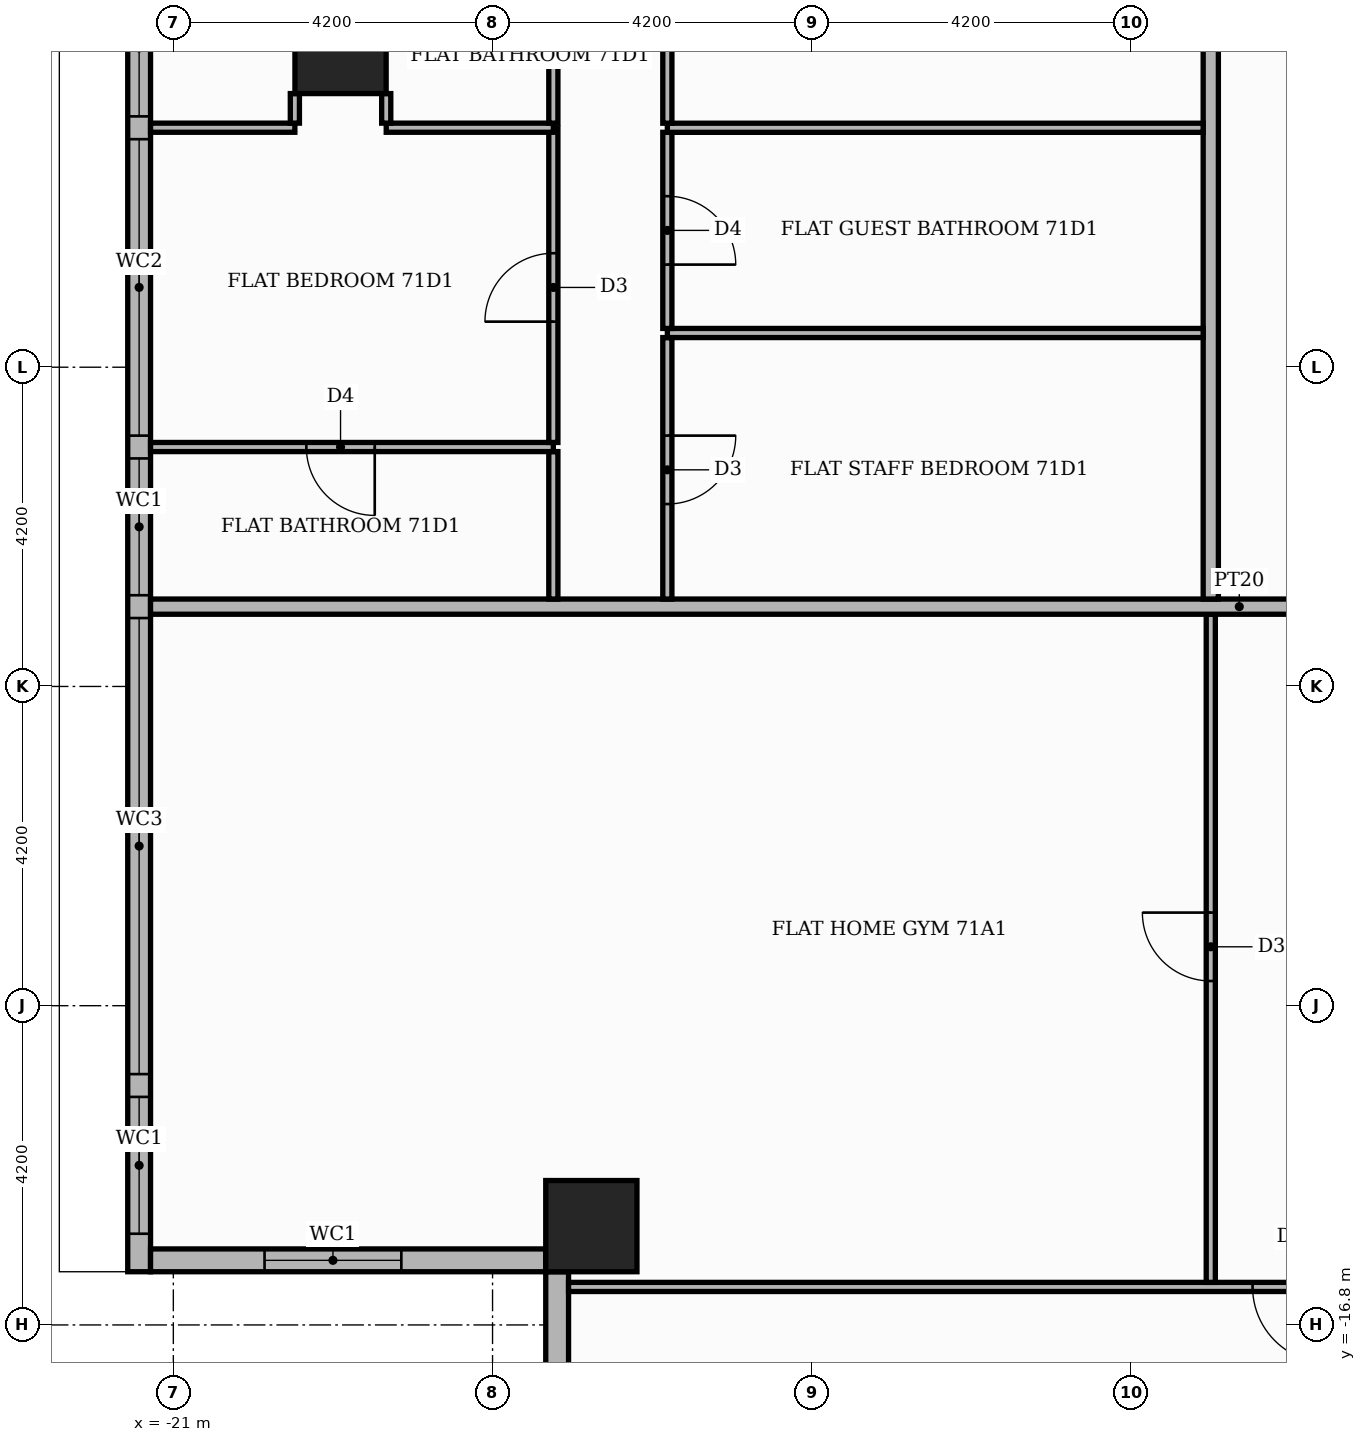
"""IFC4 building model, lengths in metres.
Left out: names, types, materials, properties, quantities, classifications, styles, units other than length and angle.
Written with IfcOpenShell. Run it as: python <this file> out.ifc"""

import sys

from ifc_helpers import new_model, si_unit, direction, frame, frame_2d, origin, origin_2d, place, context, subcontext, project, spatial, rectangle, extrude, element, fill, save


model = new_model("IFC4")
c1 = context("Model", 3, precision=1e-05, world=origin(), true_north=direction((0.0, 1.0)))
c2 = subcontext(c1, "Body", "Model", "MODEL_VIEW")
j1 = project(units=[si_unit("LENGTHUNIT", "METRE"), si_unit("PLANEANGLEUNIT", "RADIAN")], contexts=[c1])
p1 = place(None, origin())
s1 = spatial("IfcSite", under=j1, at=p1, CompositionType="ELEMENT")
p2 = place(p1, origin())
s2 = spatial("IfcBuilding", under=s1, at=p2, CompositionType="ELEMENT")
p3 = place(p2, frame((0.0, 0.0, 296.7)))
s3 = spatial("IfcBuildingStorey", under=s2, at=p3, CompositionType="ELEMENT", Elevation=296.7)
for number, where, z_axis, x_axis in (
    (1, (-18.8, 0.0, 0.0), (0.0, 0.0, 1.0), (1.0, 0.0, 0.0)),
    (2, (-15.5, -15.5, 0.0), (0.0, 0.0, 1.0), (1.0, 0.0, 0.0)),
):
    element("IfcColumn", number, at=place(p3, frame(where, z_axis=z_axis, x_axis=x_axis)), inside=s3, PredefinedType="COLUMN", context=c2, shape_type="SweptSolid", body=[
        extrude(rectangle(XDim=1.2, YDim=1.2, at=origin_2d()), origin(), (0.0, 0.0, 1.0), 3.9),
    ])
p4 = place(p3, frame((-21.45, 15.8, 0.0), z_axis=(0.0, 0.0, 1.0), x_axis=(0.0, -1.0, 0.0)))
e3 = element("IfcWall", 3, at=p4, inside=s3, PredefinedType="STANDARD", context=c2, shape_type="SweptSolid", body=[
    extrude(rectangle(XDim=31.9, YDim=0.3, at=frame_2d((15.95, 0.0))), origin(), (0.0, 0.0, 1.0), 3.55),
])
p5 = place(p4, frame((0.2, 0.0, 0.6)))
e4 = element("IfcOpeningElement", 4, at=p5, cuts=e3, PredefinedType="OPENING", context=c2, shape_type="SweptSolid", body=[
    extrude(rectangle(XDim=6.0, YDim=2.4, at=frame_2d((3.0, 1.2))), frame((0.0, 0.16, 0.0), z_axis=(0.0, -1.0, 0.0), x_axis=(1.0, 0.0, 0.0)), (0.0, 0.0, 1.0), 0.32),
])
p6 = place(p4, frame((6.5, 0.0, 0.6)))
e5 = element("IfcOpeningElement", 5, at=p6, cuts=e3, PredefinedType="OPENING", context=c2, shape_type="SweptSolid", body=[
    extrude(rectangle(XDim=1.8, YDim=2.4, at=frame_2d((0.9, 1.2))), frame((0.0, 0.16, 0.0), z_axis=(0.0, -1.0, 0.0), x_axis=(1.0, 0.0, 0.0)), (0.0, 0.0, 1.0), 0.32),
])
p7 = place(p4, frame((8.6, 0.0, 0.6)))
e6 = element("IfcOpeningElement", 6, at=p7, cuts=e3, PredefinedType="OPENING", context=c2, shape_type="SweptSolid", body=[
    extrude(rectangle(XDim=3.9, YDim=2.4, at=frame_2d((1.95, 1.2))), frame((0.0, 0.16, 0.0), z_axis=(0.0, -1.0, 0.0), x_axis=(1.0, 0.0, 0.0)), (0.0, 0.0, 1.0), 0.32),
])
p8 = place(p4, frame((12.8, 0.0, 0.6)))
e7 = element("IfcOpeningElement", 7, at=p8, cuts=e3, PredefinedType="OPENING", context=c2, shape_type="SweptSolid", body=[
    extrude(rectangle(XDim=1.8, YDim=2.4, at=frame_2d((0.9, 1.2))), frame((0.0, 0.16, 0.0), z_axis=(0.0, -1.0, 0.0), x_axis=(1.0, 0.0, 0.0)), (0.0, 0.0, 1.0), 0.32),
])
p9 = place(p4, frame((14.9, 0.0, 0.6)))
e8 = element("IfcOpeningElement", 8, at=p9, cuts=e3, PredefinedType="OPENING", context=c2, shape_type="SweptSolid", body=[
    extrude(rectangle(XDim=1.8, YDim=2.4, at=frame_2d((0.9, 1.2))), frame((0.0, 0.16, 0.0), z_axis=(0.0, -1.0, 0.0), x_axis=(1.0, 0.0, 0.0)), (0.0, 0.0, 1.0), 0.32),
])
p10 = place(p4, frame((17.0, 0.0, 0.6)))
e9 = element("IfcOpeningElement", 9, at=p10, cuts=e3, PredefinedType="OPENING", context=c2, shape_type="SweptSolid", body=[
    extrude(rectangle(XDim=3.9, YDim=2.4, at=frame_2d((1.95, 1.2))), frame((0.0, 0.16, 0.0), z_axis=(0.0, -1.0, 0.0), x_axis=(1.0, 0.0, 0.0)), (0.0, 0.0, 1.0), 0.32),
])
p11 = place(p4, frame((21.2, 0.0, 0.6)))
e10 = element("IfcOpeningElement", 10, at=p11, cuts=e3, PredefinedType="OPENING", context=c2, shape_type="SweptSolid", body=[
    extrude(rectangle(XDim=1.8, YDim=2.4, at=frame_2d((0.9, 1.2))), frame((0.0, 0.16, 0.0), z_axis=(0.0, -1.0, 0.0), x_axis=(1.0, 0.0, 0.0)), (0.0, 0.0, 1.0), 0.32),
])
p12 = place(p4, frame((23.3, 0.0, 0.6)))
e11 = element("IfcOpeningElement", 11, at=p12, cuts=e3, PredefinedType="OPENING", context=c2, shape_type="SweptSolid", body=[
    extrude(rectangle(XDim=6.0, YDim=2.4, at=frame_2d((3.0, 1.2))), frame((0.0, 0.16, 0.0), z_axis=(0.0, -1.0, 0.0), x_axis=(1.0, 0.0, 0.0)), (0.0, 0.0, 1.0), 0.32),
])
p13 = place(p4, frame((29.6, 0.0, 0.6)))
e12 = element("IfcOpeningElement", 12, at=p13, cuts=e3, PredefinedType="OPENING", context=c2, shape_type="SweptSolid", body=[
    extrude(rectangle(XDim=1.8, YDim=2.4, at=frame_2d((0.9, 1.2))), frame((0.0, 0.16, 0.0), z_axis=(0.0, -1.0, 0.0), x_axis=(1.0, 0.0, 0.0)), (0.0, 0.0, 1.0), 0.32),
])
p14 = place(p3, frame((-21.3, -15.95, 0.0), z_axis=(0.0, 0.0, 1.0), x_axis=(1.0, 0.0, 0.0)))
e13 = element("IfcWall", 13, at=p14, inside=s3, PredefinedType="STANDARD", context=c2, shape_type="SweptSolid", body=[
    extrude(rectangle(XDim=5.2, YDim=0.3, at=frame_2d((2.6, 0.0))), origin(), (0.0, 0.0, 1.0), 3.55),
])
p15 = place(p14, frame((1.5, 0.0, 0.6)))
e14 = element("IfcOpeningElement", 14, at=p15, cuts=e13, PredefinedType="OPENING", context=c2, shape_type="SweptSolid", body=[
    extrude(rectangle(XDim=1.8, YDim=2.4, at=frame_2d((0.9, 1.2))), frame((0.0, 0.16, 0.0), z_axis=(0.0, -1.0, 0.0), x_axis=(1.0, 0.0, 0.0)), (0.0, 0.0, 1.0), 0.32),
])
p16 = place(p3, frame((-15.95, -16.1, 0.0), z_axis=(0.0, 0.0, 1.0), x_axis=(0.0, -1.0, 0.0)))
e15 = element("IfcWall", 15, at=p16, inside=s3, PredefinedType="STANDARD", context=c2, shape_type="SweptSolid", body=[
    extrude(rectangle(XDim=5.5, YDim=0.3, at=frame_2d((2.75, 0.0))), origin(), (0.0, 0.0, 1.0), 3.55),
])
p17 = place(p16, frame((1.9, 0.0, 0.6)))
e16 = element("IfcOpeningElement", 16, at=p17, cuts=e15, PredefinedType="OPENING", context=c2, shape_type="SweptSolid", body=[
    extrude(rectangle(XDim=1.8, YDim=2.4, at=frame_2d((0.9, 1.2))), frame((0.0, 0.16, 0.0), z_axis=(0.0, -1.0, 0.0), x_axis=(1.0, 0.0, 0.0)), (0.0, 0.0, 1.0), 0.32),
])
p18 = place(p3, frame((-15.8, -16.3, 0.0), z_axis=(0.0, 0.0, 1.0), x_axis=(1.0, 0.0, 0.0)))
e17 = element("IfcWall", 17, at=p18, inside=s3, PredefinedType="PARTITIONING", context=c2, shape_type="SweptSolid", body=[
    extrude(rectangle(XDim=23.05, YDim=0.12, at=frame_2d((11.525, 0.0))), origin(), (0.0, 0.0, 1.0), 3.55),
])
p19 = place(p18, frame((9.0, 0.0, 0.0)))
e18 = element("IfcOpeningElement", 18, at=p19, cuts=e17, PredefinedType="OPENING", context=c2, shape_type="SweptSolid", body=[
    extrude(rectangle(XDim=1.0, YDim=2.1, at=frame_2d((0.5, 1.05))), frame((0.0, 0.07, 0.0), z_axis=(0.0, -1.0, 0.0), x_axis=(1.0, 0.0, 0.0)), (0.0, 0.0, 1.0), 0.14),
])
p20 = place(p18, frame((12.15, 0.0, 0.0)))
e19 = element("IfcOpeningElement", 19, at=p20, cuts=e17, PredefinedType="OPENING", context=c2, shape_type="SweptSolid", body=[
    extrude(rectangle(XDim=1.0, YDim=2.1, at=frame_2d((0.5, 1.05))), frame((0.0, 0.07, 0.0), z_axis=(0.0, -1.0, 0.0), x_axis=(1.0, 0.0, 0.0)), (0.0, 0.0, 1.0), 0.14),
])
p21 = place(p18, frame((16.4, 0.0, 0.0)))
e20 = element("IfcOpeningElement", 20, at=p21, cuts=e17, PredefinedType="OPENING", context=c2, shape_type="SweptSolid", body=[
    extrude(rectangle(XDim=0.9, YDim=2.1, at=frame_2d((0.45, 1.05))), frame((0.0, 0.07, 0.0), z_axis=(0.0, -1.0, 0.0), x_axis=(1.0, 0.0, 0.0)), (0.0, 0.0, 1.0), 0.14),
])
p22 = place(p3, frame((-7.35, -16.24, 0.0), z_axis=(0.0, 0.0, 1.0), x_axis=(0.0, 1.0, 0.0)))
e21 = element("IfcWall", 21, at=p22, inside=s3, PredefinedType="PARTITIONING", context=c2, shape_type="SweptSolid", body=[
    extrude(rectangle(XDim=8.79, YDim=0.12, at=frame_2d((4.395, 0.0))), origin(), (0.0, 0.0, 1.0), 3.55),
])
p23 = place(p22, frame((3.965, 0.0, 0.0)))
e22 = element("IfcOpeningElement", 22, at=p23, cuts=e21, PredefinedType="OPENING", context=c2, shape_type="SweptSolid", body=[
    extrude(rectangle(XDim=0.9, YDim=2.1, at=frame_2d((0.45, 1.05))), frame((0.0, 0.07, 0.0), z_axis=(0.0, -1.0, 0.0), x_axis=(1.0, 0.0, 0.0)), (0.0, 0.0, 1.0), 0.14),
])
p24 = place(p3, frame((-21.3, -7.35, 0.0), z_axis=(0.0, 0.0, 1.0), x_axis=(1.0, 0.0, 0.0)))
e23 = element("IfcWall", 23, at=p24, inside=s3, PredefinedType="PARTITIONING", context=c2, shape_type="SweptSolid", body=[
    extrude(rectangle(XDim=28.65, YDim=0.2, at=frame_2d((14.325, 0.0))), origin(), (0.0, 0.0, 1.0), 3.55),
])
p25 = place(p24, frame((16.55, 0.0, 0.0)))
e24 = element("IfcOpeningElement", 24, at=p25, cuts=e23, PredefinedType="OPENING", context=c2, shape_type="SweptSolid", body=[
    extrude(rectangle(XDim=1.1, YDim=2.4, at=frame_2d((0.55, 1.2))), frame((0.0, 0.11, 0.0), z_axis=(0.0, -1.0, 0.0), x_axis=(1.0, 0.0, 0.0)), (0.0, 0.0, 1.0), 0.22),
])
p26 = place(p3, frame((-16.0, -7.25, 0.0), z_axis=(0.0, 0.0, 1.0), x_axis=(0.0, 1.0, 0.0)))
e25 = element("IfcWall", 25, at=p26, inside=s3, PredefinedType="PARTITIONING", context=c2, shape_type="SweptSolid", body=[
    extrude(rectangle(XDim=1.94, YDim=0.12, at=frame_2d((0.97, 0.0))), origin(), (0.0, 0.0, 1.0), 3.55),
])
p27 = place(p3, frame((-14.5, -7.25, 0.0), z_axis=(0.0, 0.0, 1.0), x_axis=(0.0, 1.0, 0.0)))
e26 = element("IfcWall", 26, at=p27, inside=s3, PredefinedType="PARTITIONING", context=c2, shape_type="SweptSolid", body=[
    extrude(rectangle(XDim=3.44, YDim=0.12, at=frame_2d((1.72, 0.0))), origin(), (0.0, 0.0, 1.0), 3.55),
])
p28 = place(p27, frame((1.25, 0.0, 0.0)))
e27 = element("IfcOpeningElement", 27, at=p28, cuts=e26, PredefinedType="OPENING", context=c2, shape_type="SweptSolid", body=[
    extrude(rectangle(XDim=0.9, YDim=2.1, at=frame_2d((0.45, 1.05))), frame((0.0, 0.07, 0.0), z_axis=(0.0, -1.0, 0.0), x_axis=(1.0, 0.0, 0.0)), (0.0, 0.0, 1.0), 0.14),
])
p29 = place(p3, frame((-7.35, -7.25, 0.0), z_axis=(0.0, 0.0, 1.0), x_axis=(0.0, 1.0, 0.0)))
e28 = element("IfcWall", 28, at=p29, inside=s3, PredefinedType="PARTITIONING", context=c2, shape_type="SweptSolid", body=[
    extrude(rectangle(XDim=14.5, YDim=0.2, at=frame_2d((7.25, 0.0))), origin(), (0.0, 0.0, 1.0), 3.55),
])
p30 = place(p29, frame((11.95, 0.0, 0.0)))
e29 = element("IfcOpeningElement", 29, at=p30, cuts=e28, PredefinedType="OPENING", context=c2, shape_type="SweptSolid", body=[
    extrude(rectangle(XDim=1.1, YDim=2.4, at=frame_2d((0.55, 1.2))), frame((0.0, 0.11, 0.0), z_axis=(0.0, -1.0, 0.0), x_axis=(1.0, 0.0, 0.0)), (0.0, 0.0, 1.0), 0.22),
])
p31 = place(p3, frame((-21.3, -5.25, 0.0), z_axis=(0.0, 0.0, 1.0), x_axis=(1.0, 0.0, 0.0)))
e30 = element("IfcWall", 30, at=p31, inside=s3, PredefinedType="PARTITIONING", context=c2, shape_type="SweptSolid", body=[
    extrude(rectangle(XDim=5.3, YDim=0.12, at=frame_2d((2.65, 0.0))), origin(), (0.0, 0.0, 1.0), 3.55),
])
p32 = place(p31, frame((2.05, 0.0, 0.0)))
e31 = element("IfcOpeningElement", 31, at=p32, cuts=e30, PredefinedType="OPENING", context=c2, shape_type="SweptSolid", body=[
    extrude(rectangle(XDim=0.9, YDim=2.1, at=frame_2d((0.45, 1.05))), frame((0.0, 0.07, 0.0), z_axis=(0.0, -1.0, 0.0), x_axis=(1.0, 0.0, 0.0)), (0.0, 0.0, 1.0), 0.14),
])
p33 = place(p3, frame((-16.0, -5.19, 0.0), z_axis=(0.0, 0.0, 1.0), x_axis=(0.0, 1.0, 0.0)))
e32 = element("IfcWall", 32, at=p33, inside=s3, PredefinedType="PARTITIONING", context=c2, shape_type="SweptSolid", body=[
    extrude(rectangle(XDim=4.139, YDim=0.12, at=frame_2d((2.069, 0.0))), origin(), (0.0, 0.0, 1.0), 3.55),
])
p34 = place(p33, frame((1.59, 0.0, 0.0)))
e33 = element("IfcOpeningElement", 33, at=p34, cuts=e32, PredefinedType="OPENING", context=c2, shape_type="SweptSolid", body=[
    extrude(rectangle(XDim=0.9, YDim=2.1, at=frame_2d((0.45, 1.05))), frame((0.0, 0.07, 0.0), z_axis=(0.0, -1.0, 0.0), x_axis=(1.0, 0.0, 0.0)), (0.0, 0.0, 1.0), 0.14),
])
p35 = place(p3, frame((-14.5, -3.75, 0.0), z_axis=(0.0, 0.0, 1.0), x_axis=(1.0, 0.0, 0.0)))
e34 = element("IfcWall", 34, at=p35, inside=s3, PredefinedType="PARTITIONING", context=c2, shape_type="SweptSolid", body=[
    extrude(rectangle(XDim=7.05, YDim=0.12, at=frame_2d((3.525, 0.0))), origin(), (0.0, 0.0, 1.0), 3.55),
])
p36 = place(p3, frame((-14.5, -3.69, 0.0), z_axis=(0.0, 0.0, 1.0), x_axis=(0.0, 1.0, 0.0)))
e35 = element("IfcWall", 35, at=p36, inside=s3, PredefinedType="PARTITIONING", context=c2, shape_type="SweptSolid", body=[
    extrude(rectangle(XDim=2.58, YDim=0.12, at=frame_2d((1.29, 0.0))), origin(), (0.0, 0.0, 1.0), 3.55),
])
p37 = place(p36, frame((0.84, 0.0, 0.0)))
e36 = element("IfcOpeningElement", 36, at=p37, cuts=e35, PredefinedType="OPENING", context=c2, shape_type="SweptSolid", body=[
    extrude(rectangle(XDim=0.9, YDim=2.1, at=frame_2d((0.45, 1.05))), frame((0.0, 0.07, 0.0), z_axis=(0.0, -1.0, 0.0), x_axis=(1.0, 0.0, 0.0)), (0.0, 0.0, 1.0), 0.14),
])
p38 = place(p3, frame((-14.5, -1.05, 0.0), z_axis=(0.0, 0.0, 1.0), x_axis=(1.0, 0.0, 0.0)))
e37 = element("IfcWall", 37, at=p38, inside=s3, PredefinedType="PARTITIONING", context=c2, shape_type="SweptSolid", body=[
    extrude(rectangle(XDim=7.05, YDim=0.12, at=frame_2d((3.525, 0.0))), origin(), (0.0, 0.0, 1.0), 3.55),
])
p39 = place(p3, frame((-21.3, -1.049, 0.0), z_axis=(0.0, 0.0, 1.0), x_axis=(1.0, 0.0, 0.0)))
e38 = element("IfcWall", 38, at=p39, inside=s3, PredefinedType="PARTITIONING", context=c2, shape_type="SweptSolid", body=[
    extrude(rectangle(XDim=1.899, YDim=0.12, at=frame_2d((0.95, 0.0))), origin(), (0.0, 0.0, 1.0), 3.55),
])
p40 = place(p3, frame((-18.199, -1.049, 0.0), z_axis=(0.0, 0.0, 1.0), x_axis=(1.0, 0.0, 0.0)))
e39 = element("IfcWall", 39, at=p40, inside=s3, PredefinedType="PARTITIONING", context=c2, shape_type="SweptSolid", body=[
    extrude(rectangle(XDim=2.199, YDim=0.12, at=frame_2d((1.1, 0.0))), origin(), (0.0, 0.0, 1.0), 3.55),
])
p41 = place(p3, frame((-14.5, -0.99, 0.0), z_axis=(0.0, 0.0, 1.0), x_axis=(0.0, 1.0, 0.0)))
e40 = element("IfcWall", 40, at=p41, inside=s3, PredefinedType="PARTITIONING", context=c2, shape_type="SweptSolid", body=[
    extrude(rectangle(XDim=4.08, YDim=0.12, at=frame_2d((2.04, 0.0))), origin(), (0.0, 0.0, 1.0), 3.55),
])
for number, where, z_axis, x_axis in (
    (41, (-19.401, -0.989, 0.0), (0.0, 0.0, 1.0), (0.0, 1.0, 0.0)),
    (42, (-18.199, -0.989, 0.0), (0.0, 0.0, 1.0), (0.0, 1.0, 0.0)),
):
    element("IfcWall", number, at=place(p3, frame(where, z_axis=z_axis, x_axis=x_axis)), inside=s3, PredefinedType="PARTITIONING", context=c2, shape_type="SweptSolid", body=[
        extrude(rectangle(XDim=0.389, YDim=0.12, at=frame_2d((0.194, 0.0))), origin(), (0.0, 0.0, 1.0), 3.55),
    ])
p42 = place(p3, frame((-16.0, -0.989, 0.0), z_axis=(0.0, 0.0, 1.0), x_axis=(0.0, 1.0, 0.0)))
e43 = element("IfcWall", 43, at=p42, inside=s3, PredefinedType="PARTITIONING", context=c2, shape_type="SweptSolid", body=[
    extrude(rectangle(XDim=1.978, YDim=0.12, at=frame_2d((0.989, 0.0))), origin(), (0.0, 0.0, 1.0), 3.55),
])
p43 = place(p9, origin())
e44 = element("IfcWindow", 44, at=p43, inside=s3, PartitioningType="SINGLE_PANEL", PredefinedType="WINDOW", context=c2, shape_type="SweptSolid", body=[
    extrude(rectangle(XDim=1.8, YDim=2.4, at=frame_2d((0.9, 1.2))), frame((0.0, 0.03, 0.0), z_axis=(0.0, -1.0, 0.0), x_axis=(1.0, 0.0, 0.0)), (0.0, 0.0, 1.0), 0.06),
])
fill(e8, e44)
p44 = place(p10, origin())
e45 = element("IfcWindow", 45, at=p44, inside=s3, PartitioningType="SINGLE_PANEL", PredefinedType="WINDOW", context=c2, shape_type="SweptSolid", body=[
    extrude(rectangle(XDim=3.9, YDim=2.4, at=frame_2d((1.95, 1.2))), frame((0.0, 0.03, 0.0), z_axis=(0.0, -1.0, 0.0), x_axis=(1.0, 0.0, 0.0)), (0.0, 0.0, 1.0), 0.06),
])
fill(e9, e45)
p45 = place(p11, origin())
e46 = element("IfcWindow", 46, at=p45, inside=s3, PartitioningType="SINGLE_PANEL", PredefinedType="WINDOW", context=c2, shape_type="SweptSolid", body=[
    extrude(rectangle(XDim=1.8, YDim=2.4, at=frame_2d((0.9, 1.2))), frame((0.0, 0.03, 0.0), z_axis=(0.0, -1.0, 0.0), x_axis=(1.0, 0.0, 0.0)), (0.0, 0.0, 1.0), 0.06),
])
fill(e10, e46)
p46 = place(p12, origin())
e47 = element("IfcWindow", 47, at=p46, inside=s3, PartitioningType="SINGLE_PANEL", PredefinedType="WINDOW", context=c2, shape_type="SweptSolid", body=[
    extrude(rectangle(XDim=6.0, YDim=2.4, at=frame_2d((3.0, 1.2))), frame((0.0, 0.03, 0.0), z_axis=(0.0, -1.0, 0.0), x_axis=(1.0, 0.0, 0.0)), (0.0, 0.0, 1.0), 0.06),
])
fill(e11, e47)
p47 = place(p13, origin())
e48 = element("IfcWindow", 48, at=p47, inside=s3, PartitioningType="SINGLE_PANEL", PredefinedType="WINDOW", context=c2, shape_type="SweptSolid", body=[
    extrude(rectangle(XDim=1.8, YDim=2.4, at=frame_2d((0.9, 1.2))), frame((0.0, 0.03, 0.0), z_axis=(0.0, -1.0, 0.0), x_axis=(1.0, 0.0, 0.0)), (0.0, 0.0, 1.0), 0.06),
])
fill(e12, e48)
p48 = place(p15, origin())
e49 = element("IfcWindow", 49, at=p48, inside=s3, PartitioningType="SINGLE_PANEL", PredefinedType="WINDOW", context=c2, shape_type="SweptSolid", body=[
    extrude(rectangle(XDim=1.8, YDim=2.4, at=frame_2d((0.9, 1.2))), frame((0.0, 0.03, 0.0), z_axis=(0.0, -1.0, 0.0), x_axis=(1.0, 0.0, 0.0)), (0.0, 0.0, 1.0), 0.06),
])
fill(e14, e49)
p49 = place(p23, origin())
e50 = element("IfcDoor", 50, at=p49, inside=s3, OperationType="SINGLE_SWING_RIGHT", PredefinedType="DOOR", context=c2, shape_type="SweptSolid", body=[
    extrude(rectangle(XDim=0.9, YDim=2.1, at=frame_2d((0.45, 1.05))), frame((0.0, 0.025, 0.0), z_axis=(0.0, -1.0, 0.0), x_axis=(1.0, 0.0, 0.0)), (0.0, 0.0, 1.0), 0.05),
])
fill(e22, e50)
p50 = place(p19, frame((1.0, 0.0, 0.0), z_axis=(0.0, 0.0, 1.0), x_axis=(-1.0, 0.0, 0.0)))
e51 = element("IfcDoor", 51, at=p50, inside=s3, OperationType="SINGLE_SWING_RIGHT", PredefinedType="DOOR", context=c2, shape_type="SweptSolid", body=[
    extrude(rectangle(XDim=1.0, YDim=2.1, at=frame_2d((0.5, 1.05))), frame((0.0, 0.025, 0.0), z_axis=(0.0, -1.0, 0.0), x_axis=(1.0, 0.0, 0.0)), (0.0, 0.0, 1.0), 0.05),
])
fill(e18, e51)
p51 = place(p37, frame((0.9, 0.0, 0.0), z_axis=(0.0, 0.0, 1.0), x_axis=(-1.0, 0.0, 0.0)))
e52 = element("IfcDoor", 52, at=p51, inside=s3, OperationType="SINGLE_SWING_LEFT", PredefinedType="DOOR", context=c2, shape_type="SweptSolid", body=[
    extrude(rectangle(XDim=0.9, YDim=2.1, at=frame_2d((0.45, 1.05))), frame((0.0, 0.025, 0.0), z_axis=(0.0, -1.0, 0.0), x_axis=(1.0, 0.0, 0.0)), (0.0, 0.0, 1.0), 0.05),
])
fill(e36, e52)
p52 = place(p28, frame((0.9, 0.0, 0.0), z_axis=(0.0, 0.0, 1.0), x_axis=(-1.0, 0.0, 0.0)))
e53 = element("IfcDoor", 53, at=p52, inside=s3, OperationType="SINGLE_SWING_RIGHT", PredefinedType="DOOR", context=c2, shape_type="SweptSolid", body=[
    extrude(rectangle(XDim=0.9, YDim=2.1, at=frame_2d((0.45, 1.05))), frame((0.0, 0.025, 0.0), z_axis=(0.0, -1.0, 0.0), x_axis=(1.0, 0.0, 0.0)), (0.0, 0.0, 1.0), 0.05),
])
fill(e27, e53)
p53 = place(p34, origin())
e54 = element("IfcDoor", 54, at=p53, inside=s3, OperationType="SINGLE_SWING_LEFT", PredefinedType="DOOR", context=c2, shape_type="SweptSolid", body=[
    extrude(rectangle(XDim=0.9, YDim=2.1, at=frame_2d((0.45, 1.05))), frame((0.0, 0.025, 0.0), z_axis=(0.0, -1.0, 0.0), x_axis=(1.0, 0.0, 0.0)), (0.0, 0.0, 1.0), 0.05),
])
fill(e33, e54)
p54 = place(p32, frame((0.9, 0.0, 0.0), z_axis=(0.0, 0.0, 1.0), x_axis=(-1.0, 0.0, 0.0)))
e55 = element("IfcDoor", 55, at=p54, inside=s3, OperationType="SINGLE_SWING_RIGHT", PredefinedType="DOOR", context=c2, shape_type="SweptSolid", body=[
    extrude(rectangle(XDim=0.9, YDim=2.1, at=frame_2d((0.45, 1.05))), frame((0.0, 0.025, 0.0), z_axis=(0.0, -1.0, 0.0), x_axis=(1.0, 0.0, 0.0)), (0.0, 0.0, 1.0), 0.05),
])
fill(e31, e55)
save(model, sys.argv[1])
